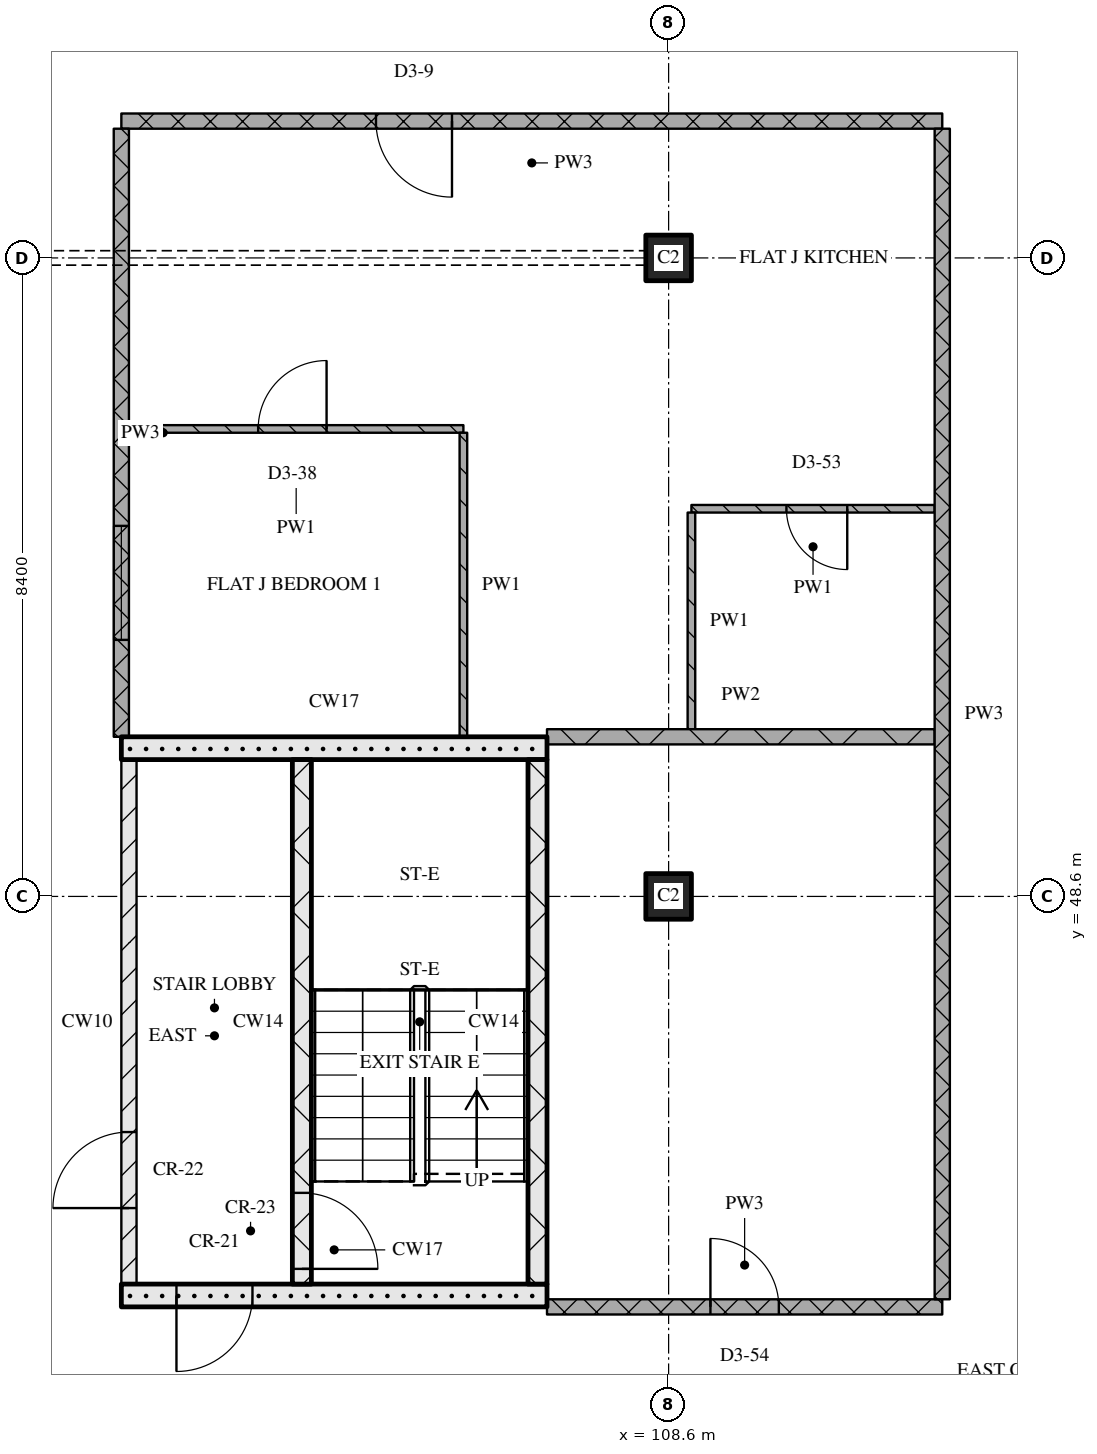
"""IFC4 building model, lengths in metres.
Left out: names, types, materials, properties, quantities, classifications, styles, units other than length and angle.
Written with IfcOpenShell. Run it as: python <this file> out.ifc"""

import sys

from ifc_helpers import new_model, si_unit, direction, frame, frame_2d, origin, origin_2d, place, context, subcontext, project, spatial, rectangle, extrude, element, fill, save


model = new_model("IFC4")
c1 = context("Model", 3, precision=1e-05, world=origin(), true_north=direction((0.0, 1.0)))
c2 = subcontext(c1, "Body", "Model", "MODEL_VIEW")
j1 = project(units=[si_unit("LENGTHUNIT", "METRE"), si_unit("PLANEANGLEUNIT", "RADIAN")], contexts=[c1])
p1 = place(None, origin())
s1 = spatial("IfcSite", under=j1, at=p1, CompositionType="ELEMENT")
p2 = place(p1, origin())
s2 = spatial("IfcBuilding", under=s1, at=p2, CompositionType="ELEMENT")
p3 = place(p2, frame((0.0, 0.0, 227.1)))
s3 = spatial("IfcBuildingStorey", under=s2, at=p3, CompositionType="ELEMENT", Elevation=227.1)
for number, where, z_axis, x_axis in (
    (1, (108.6, 48.6, 0.0), (0.0, 0.0, 1.0), (1.0, 0.0, 0.0)),
    (2, (108.6, 57.0, 0.0), (0.0, 0.0, 1.0), (1.0, 0.0, 0.0)),
):
    element("IfcColumn", number, at=place(p3, frame(where, z_axis=z_axis, x_axis=x_axis)), inside=s3, PredefinedType="COLUMN", context=c2, shape_type="SweptSolid", body=[
        extrude(rectangle(XDim=0.6, YDim=0.6, at=origin_2d()), origin(), (0.0, 0.0, 1.0), 3.6),
    ])
p4 = place(p3, frame((101.4, 43.35, 0.0), z_axis=(0.0, 0.0, 1.0), x_axis=(1.0, 0.0, 0.0)))
e3 = element("IfcWall", 3, at=p4, inside=s3, PredefinedType="SOLIDWALL", context=c2, shape_type="SweptSolid", body=[
    extrude(rectangle(XDim=5.6, YDim=0.3, at=frame_2d((2.8, 0.0))), origin(), (0.0, 0.0, 1.0), 3.32),
])
p5 = place(p4, frame((0.725, 0.0, 0.0)))
e4 = element("IfcOpeningElement", 4, at=p5, cuts=e3, PredefinedType="OPENING", context=c2, shape_type="SweptSolid", body=[
    extrude(rectangle(XDim=1.0, YDim=2.1, at=frame_2d((0.5, 1.05))), frame((0.0, 0.16, 0.0), z_axis=(0.0, -1.0, 0.0), x_axis=(1.0, 0.0, 0.0)), (0.0, 0.0, 1.0), 0.32),
])
p6 = place(p3, frame((101.5, 43.5, 0.0), z_axis=(0.0, 0.0, 1.0), x_axis=(0.0, 1.0, 0.0)))
e5 = element("IfcWall", 5, at=p6, inside=s3, PredefinedType="PARTITIONING", context=c2, shape_type="SweptSolid", body=[
    extrude(rectangle(XDim=6.9, YDim=0.2, at=frame_2d((3.45, 0.0))), origin(), (0.0, 0.0, 1.0), 3.32),
])
p7 = place(p6, frame((1.0, 0.0, 0.0)))
e6 = element("IfcOpeningElement", 6, at=p7, cuts=e5, PredefinedType="OPENING", context=c2, shape_type="SweptSolid", body=[
    extrude(rectangle(XDim=1.0, YDim=2.1, at=frame_2d((0.5, 1.05))), frame((0.0, 0.11, 0.0), z_axis=(0.0, -1.0, 0.0), x_axis=(1.0, 0.0, 0.0)), (0.0, 0.0, 1.0), 0.22),
])
p8 = place(p3, frame((103.775, 43.5, 0.0), z_axis=(0.0, 0.0, 1.0), x_axis=(0.0, 1.0, 0.0)))
e7 = element("IfcWall", 7, at=p8, inside=s3, PredefinedType="SOLIDWALL", context=c2, shape_type="SweptSolid", body=[
    extrude(rectangle(XDim=6.9, YDim=0.25, at=frame_2d((3.45, 0.0))), origin(), (0.0, 0.0, 1.0), 3.32),
])
p9 = place(p8, frame((0.2, 0.0, 0.0)))
e8 = element("IfcOpeningElement", 8, at=p9, cuts=e7, PredefinedType="OPENING", context=c2, shape_type="SweptSolid", body=[
    extrude(rectangle(XDim=1.0, YDim=2.1, at=frame_2d((0.5, 1.05))), frame((0.0, 0.135, 0.0), z_axis=(0.0, -1.0, 0.0), x_axis=(1.0, 0.0, 0.0)), (0.0, 0.0, 1.0), 0.27),
])
p10 = place(p3, frame((106.875, 43.5, 0.0), z_axis=(0.0, 0.0, 1.0), x_axis=(0.0, 1.0, 0.0)))
e9 = element("IfcWall", 9, at=p10, inside=s3, PredefinedType="SOLIDWALL", context=c2, shape_type="SweptSolid", body=[
    extrude(rectangle(XDim=6.9, YDim=0.25, at=frame_2d((3.45, 0.0))), origin(), (0.0, 0.0, 1.0), 3.32),
])
p11 = place(p3, frame((101.4, 50.55, 0.0), z_axis=(0.0, 0.0, 1.0), x_axis=(1.0, 0.0, 0.0)))
e10 = element("IfcWall", 10, at=p11, inside=s3, PredefinedType="SOLIDWALL", context=c2, shape_type="SweptSolid", body=[
    extrude(rectangle(XDim=5.6, YDim=0.3, at=frame_2d((2.8, 0.0))), origin(), (0.0, 0.0, 1.0), 3.32),
])
p12 = place(p3, frame((107.0, 43.2, 0.0), z_axis=(0.0, 0.0, 1.0), x_axis=(1.0, 0.0, 0.0)))
e11 = element("IfcWall", 11, at=p12, inside=s3, PredefinedType="PARTITIONING", context=c2, shape_type="SweptSolid", body=[
    extrude(rectangle(XDim=5.2, YDim=0.2, at=frame_2d((2.6, 0.0))), origin(), (0.0, 0.0, 1.0), 3.32),
])
p13 = place(p12, frame((2.15, 0.0, 0.0)))
e12 = element("IfcOpeningElement", 12, at=p13, cuts=e11, PredefinedType="OPENING", context=c2, shape_type="SweptSolid", body=[
    extrude(rectangle(XDim=0.9, YDim=2.1, at=frame_2d((0.45, 1.05))), frame((0.0, 0.11, 0.0), z_axis=(0.0, -1.0, 0.0), x_axis=(1.0, 0.0, 0.0)), (0.0, 0.0, 1.0), 0.22),
])
p14 = place(p3, frame((107.0, 50.7, 0.0), z_axis=(0.0, 0.0, 1.0), x_axis=(1.0, 0.0, 0.0)))
e13 = element("IfcWall", 13, at=p14, inside=s3, PredefinedType="PARTITIONING", context=c2, shape_type="SweptSolid", body=[
    extrude(rectangle(XDim=5.1, YDim=0.2, at=frame_2d((2.55, 0.0))), origin(), (0.0, 0.0, 1.0), 3.32),
])
p15 = place(p3, frame((112.1, 53.7, 0.0), z_axis=(0.0, 0.0, 1.0), x_axis=(-1.0, 0.0, 0.0)))
e14 = element("IfcWall", 14, at=p15, inside=s3, PredefinedType="PARTITIONING", context=c2, shape_type="SweptSolid", body=[
    extrude(rectangle(XDim=3.2, YDim=0.1, at=frame_2d((1.6, 0.0))), origin(), (0.0, 0.0, 1.0), 3.32),
])
p16 = place(p15, frame((1.15, 0.0, 0.0)))
e15 = element("IfcOpeningElement", 15, at=p16, cuts=e14, PredefinedType="OPENING", context=c2, shape_type="SweptSolid", body=[
    extrude(rectangle(XDim=0.8, YDim=2.1, at=frame_2d((0.4, 1.05))), frame((0.0, 0.06, 0.0), z_axis=(0.0, -1.0, 0.0), x_axis=(1.0, 0.0, 0.0)), (0.0, 0.0, 1.0), 0.12),
])
p17 = place(p3, frame((105.9, 54.75, 0.0), z_axis=(0.0, 0.0, 1.0), x_axis=(-1.0, 0.0, 0.0)))
e16 = element("IfcWall", 16, at=p17, inside=s3, PredefinedType="PARTITIONING", context=c2, shape_type="SweptSolid", body=[
    extrude(rectangle(XDim=4.4, YDim=0.1, at=frame_2d((2.2, 0.0))), origin(), (0.0, 0.0, 1.0), 3.32),
])
p18 = place(p17, frame((1.8, 0.0, 0.0)))
e17 = element("IfcOpeningElement", 17, at=p18, cuts=e16, PredefinedType="OPENING", context=c2, shape_type="SweptSolid", body=[
    extrude(rectangle(XDim=0.9, YDim=2.1, at=frame_2d((0.45, 1.05))), frame((0.0, 0.06, 0.0), z_axis=(0.0, -1.0, 0.0), x_axis=(1.0, 0.0, 0.0)), (0.0, 0.0, 1.0), 0.12),
])
p19 = place(p3, frame((112.2, 58.8, 0.0), z_axis=(0.0, 0.0, 1.0), x_axis=(-1.0, 0.0, 0.0)))
e18 = element("IfcWall", 18, at=p19, inside=s3, PredefinedType="PARTITIONING", context=c2, shape_type="SweptSolid", body=[
    extrude(rectangle(XDim=10.8, YDim=0.2, at=frame_2d((5.4, 0.0))), origin(), (0.0, 0.0, 1.0), 3.32),
])
p20 = place(p19, frame((6.45, 0.0, 0.0)))
e19 = element("IfcOpeningElement", 19, at=p20, cuts=e18, PredefinedType="OPENING", context=c2, shape_type="SweptSolid", body=[
    extrude(rectangle(XDim=1.0, YDim=2.1, at=frame_2d((0.5, 1.05))), frame((0.0, 0.11, 0.0), z_axis=(0.0, -1.0, 0.0), x_axis=(1.0, 0.0, 0.0)), (0.0, 0.0, 1.0), 0.22),
])
p21 = place(p3, frame((101.4, 58.7, 0.0), z_axis=(0.0, 0.0, 1.0), x_axis=(0.0, -1.0, 0.0)))
e20 = element("IfcWall", 20, at=p21, inside=s3, PredefinedType="PARTITIONING", context=c2, shape_type="SweptSolid", body=[
    extrude(rectangle(XDim=8.0, YDim=0.2, at=frame_2d((4.0, 0.0))), origin(), (0.0, 0.0, 1.0), 3.32),
])
p22 = place(p21, frame((5.225, 0.0, 0.9)))
e21 = element("IfcOpeningElement", 21, at=p22, cuts=e20, PredefinedType="OPENING", context=c2, shape_type="SweptSolid", body=[
    extrude(rectangle(XDim=1.5, YDim=1.5, at=frame_2d((0.75, 0.75))), frame((0.0, 0.11, 0.0), z_axis=(0.0, -1.0, 0.0), x_axis=(1.0, 0.0, 0.0)), (0.0, 0.0, 1.0), 0.22),
])
p23 = place(p3, frame((105.9, 54.7, 0.0), z_axis=(0.0, 0.0, 1.0), x_axis=(0.0, -1.0, 0.0)))
e22 = element("IfcWall", 22, at=p23, inside=s3, PredefinedType="PARTITIONING", context=c2, shape_type="SweptSolid", body=[
    extrude(rectangle(XDim=4.0, YDim=0.1, at=frame_2d((2.0, 0.0))), origin(), (0.0, 0.0, 1.0), 3.32),
])
p24 = place(p3, frame((108.9, 53.65, 0.0), z_axis=(0.0, 0.0, 1.0), x_axis=(0.0, -1.0, 0.0)))
e23 = element("IfcWall", 23, at=p24, inside=s3, PredefinedType="PARTITIONING", context=c2, shape_type="SweptSolid", body=[
    extrude(rectangle(XDim=2.85, YDim=0.1, at=frame_2d((1.425, 0.0))), origin(), (0.0, 0.0, 1.0), 3.32),
])
p25 = place(p3, frame((112.2, 58.7, 0.0), z_axis=(0.0, 0.0, 1.0), x_axis=(0.0, -1.0, 0.0)))
e24 = element("IfcWall", 24, at=p25, inside=s3, PredefinedType="PARTITIONING", context=c2, shape_type="SweptSolid", body=[
    extrude(rectangle(XDim=15.4, YDim=0.2, at=frame_2d((7.7, 0.0))), origin(), (0.0, 0.0, 1.0), 3.32),
])
p26 = place(p5, origin())
e25 = element("IfcDoor", 25, at=p26, inside=s3, OperationType="SINGLE_SWING_RIGHT", PredefinedType="DOOR", context=c2, shape_type="SweptSolid", body=[
    extrude(rectangle(XDim=1.0, YDim=2.1, at=frame_2d((0.5, 1.05))), frame((0.0, 0.025, 0.0), z_axis=(0.0, -1.0, 0.0), x_axis=(1.0, 0.0, 0.0)), (0.0, 0.0, 1.0), 0.05),
])
fill(e4, e25)
p27 = place(p9, origin())
e26 = element("IfcDoor", 26, at=p27, inside=s3, OperationType="SINGLE_SWING_RIGHT", PredefinedType="DOOR", context=c2, shape_type="SweptSolid", body=[
    extrude(rectangle(XDim=1.0, YDim=2.1, at=frame_2d((0.5, 1.05))), frame((0.0, 0.025, 0.0), z_axis=(0.0, -1.0, 0.0), x_axis=(1.0, 0.0, 0.0)), (0.0, 0.0, 1.0), 0.05),
])
fill(e8, e26)
p28 = place(p7, origin())
e27 = element("IfcDoor", 27, at=p28, inside=s3, OperationType="SINGLE_SWING_LEFT", PredefinedType="DOOR", context=c2, shape_type="SweptSolid", body=[
    extrude(rectangle(XDim=1.0, YDim=2.1, at=frame_2d((0.5, 1.05))), frame((0.0, 0.025, 0.0), z_axis=(0.0, -1.0, 0.0), x_axis=(1.0, 0.0, 0.0)), (0.0, 0.0, 1.0), 0.05),
])
fill(e6, e27)
p29 = place(p13, origin())
e28 = element("IfcDoor", 28, at=p29, inside=s3, OperationType="SINGLE_SWING_LEFT", PredefinedType="DOOR", context=c2, shape_type="SweptSolid", body=[
    extrude(rectangle(XDim=0.9, YDim=2.1, at=frame_2d((0.45, 1.05))), frame((0.0, 0.025, 0.0), z_axis=(0.0, -1.0, 0.0), x_axis=(1.0, 0.0, 0.0)), (0.0, 0.0, 1.0), 0.05),
])
fill(e12, e28)
p30 = place(p16, origin())
e29 = element("IfcDoor", 29, at=p30, inside=s3, OperationType="SINGLE_SWING_LEFT", PredefinedType="DOOR", context=c2, shape_type="SweptSolid", body=[
    extrude(rectangle(XDim=0.8, YDim=2.1, at=frame_2d((0.4, 1.05))), frame((0.0, 0.025, 0.0), z_axis=(0.0, -1.0, 0.0), x_axis=(1.0, 0.0, 0.0)), (0.0, 0.0, 1.0), 0.05),
])
fill(e15, e29)
p31 = place(p18, origin())
e30 = element("IfcDoor", 30, at=p31, inside=s3, OperationType="SINGLE_SWING_RIGHT", PredefinedType="DOOR", context=c2, shape_type="SweptSolid", body=[
    extrude(rectangle(XDim=0.9, YDim=2.1, at=frame_2d((0.45, 1.05))), frame((0.0, 0.025, 0.0), z_axis=(0.0, -1.0, 0.0), x_axis=(1.0, 0.0, 0.0)), (0.0, 0.0, 1.0), 0.05),
])
fill(e17, e30)
p32 = place(p20, origin())
e31 = element("IfcDoor", 31, at=p32, inside=s3, OperationType="SINGLE_SWING_LEFT", PredefinedType="DOOR", context=c2, shape_type="SweptSolid", body=[
    extrude(rectangle(XDim=1.0, YDim=2.1, at=frame_2d((0.5, 1.05))), frame((0.0, 0.025, 0.0), z_axis=(0.0, -1.0, 0.0), x_axis=(1.0, 0.0, 0.0)), (0.0, 0.0, 1.0), 0.05),
])
fill(e19, e31)
p33 = place(p22, origin())
e32 = element("IfcWindow", 32, at=p33, inside=s3, PartitioningType="SINGLE_PANEL", PredefinedType="WINDOW", context=c2, shape_type="SweptSolid", body=[
    extrude(rectangle(XDim=1.5, YDim=1.5, at=frame_2d((0.75, 0.75))), frame((0.0, 0.03, 0.0), z_axis=(0.0, -1.0, 0.0), x_axis=(1.0, 0.0, 0.0)), (0.0, 0.0, 1.0), 0.06),
])
fill(e21, e32)
save(model, sys.argv[1])
